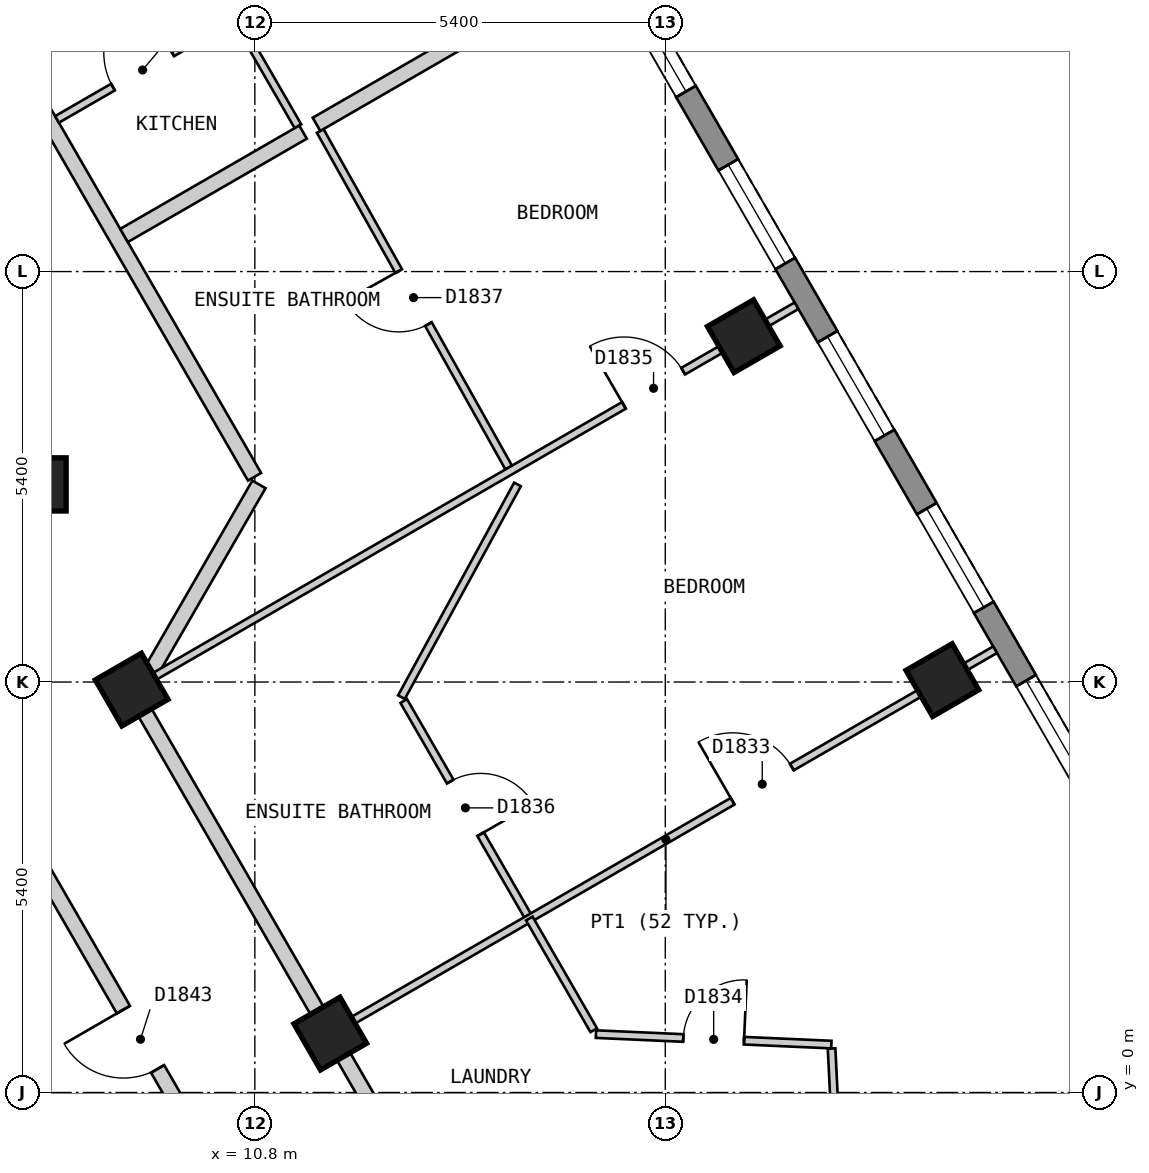
"""IFC4 building model, lengths in metres.
Left out: names, types, materials, properties, quantities, classifications, styles, units other than length and angle.
Written with IfcOpenShell. Run it as: python <this file> out.ifc"""

import sys

from ifc_helpers import new_model, si_unit, direction, frame, frame_2d, origin, origin_2d, place, context, subcontext, project, spatial, polyline, rectangle, outline, extrude, element, fill, save


model = new_model("IFC4")
c1 = context("Model", 3, precision=1e-05, world=origin(), true_north=direction((0.0, 1.0)))
c2 = subcontext(c1, "Body", "Model", "MODEL_VIEW")
j1 = project(units=[si_unit("LENGTHUNIT", "METRE"), si_unit("PLANEANGLEUNIT", "RADIAN")], contexts=[c1])
p1 = place(None, origin())
s1 = spatial("IfcSite", under=j1, at=p1, CompositionType="ELEMENT")
p2 = place(p1, origin())
s2 = spatial("IfcBuilding", under=s1, at=p2, CompositionType="ELEMENT")
p3 = place(p2, frame((0.0, 0.0, 208.8)))
s3 = spatial("IfcBuildingStorey", under=s2, at=p3, CompositionType="ELEMENT", Elevation=208.8)
for number, where, z_axis, x_axis in (
    (1, (19.846, 5.425, 0.0), (0.0, 0.0, 1.0), (-0.5, 0.866, 0.0)),
    (2, (17.233, 9.95, 0.0), (0.0, 0.0, 1.0), (-0.5, 0.866, 0.0)),
    (3, (11.792, 0.775, 0.0), (0.0, 0.0, 1.0), (-0.5, 0.866, 0.0)),
    (4, (9.179, 5.3, 0.0), (0.0, 0.0, 1.0), (-0.5, 0.866, 0.0)),
    (5, (7.967, 8.0, 0.0), (0.0, 0.0, 1.0), (1.0, 0.0, 0.0)),
):
    element("IfcColumn", number, at=place(p3, frame(where, z_axis=z_axis, x_axis=x_axis)), inside=s3, PredefinedType="COLUMN", context=c2, shape_type="SweptSolid", body=[
        extrude(rectangle(XDim=0.7, YDim=0.7, at=origin_2d()), origin(), (0.0, 0.0, 1.0), 3.0),
    ])
p4 = place(p3, frame((23.599, 0.825, 0.0), z_axis=(0.0, 0.0, 1.0), x_axis=(-0.500003656944, 0.866023292436, 0.0)))
e6 = element("IfcWall", 6, at=p4, inside=s3, PredefinedType="SOLIDWALL", context=c2, shape_type="SweptSolid", body=[
    extrude(outline(polyline([(0.0, -0.15), (22.17, -0.15), (22.09, 0.15), (0.08, 0.15), (0.0, -0.15)])), origin(), (0.0, 0.0, 1.0), 2.7),
])
p5 = place(p4, frame((1.191, 0.0, 0.15)))
e7 = element("IfcOpeningElement", 7, at=p5, cuts=e6, PredefinedType="OPENING", context=c2, shape_type="SweptSolid", body=[
    extrude(rectangle(XDim=1.5, YDim=2.1, at=frame_2d((0.75, 1.05))), frame((0.0, 0.16, 0.0), z_axis=(0.0, -1.0, 0.0), x_axis=(1.0, 0.0, 0.0)), (0.0, 0.0, 1.0), 0.32),
])
p6 = place(p4, frame((3.804, 0.0, 0.15)))
e8 = element("IfcOpeningElement", 8, at=p6, cuts=e6, PredefinedType="OPENING", context=c2, shape_type="SweptSolid", body=[
    extrude(rectangle(XDim=1.5, YDim=2.1, at=frame_2d((0.75, 1.05))), frame((0.0, 0.16, 0.0), z_axis=(0.0, -1.0, 0.0), x_axis=(1.0, 0.0, 0.0)), (0.0, 0.0, 1.0), 0.32),
])
p7 = place(p4, frame((6.417, 0.0, 0.15)))
e9 = element("IfcOpeningElement", 9, at=p7, cuts=e6, PredefinedType="OPENING", context=c2, shape_type="SweptSolid", body=[
    extrude(rectangle(XDim=1.5, YDim=2.1, at=frame_2d((0.75, 1.05))), frame((0.0, 0.16, 0.0), z_axis=(0.0, -1.0, 0.0), x_axis=(1.0, 0.0, 0.0)), (0.0, 0.0, 1.0), 0.32),
])
p8 = place(p4, frame((9.029, 0.0, 0.15)))
e10 = element("IfcOpeningElement", 10, at=p8, cuts=e6, PredefinedType="OPENING", context=c2, shape_type="SweptSolid", body=[
    extrude(rectangle(XDim=1.5, YDim=2.1, at=frame_2d((0.75, 1.05))), frame((0.0, 0.16, 0.0), z_axis=(0.0, -1.0, 0.0), x_axis=(1.0, 0.0, 0.0)), (0.0, 0.0, 1.0), 0.32),
])
p9 = place(p4, frame((11.641, 0.0, 0.15)))
e11 = element("IfcOpeningElement", 11, at=p9, cuts=e6, PredefinedType="OPENING", context=c2, shape_type="SweptSolid", body=[
    extrude(rectangle(XDim=1.5, YDim=2.1, at=frame_2d((0.75, 1.05))), frame((0.0, 0.16, 0.0), z_axis=(0.0, -1.0, 0.0), x_axis=(1.0, 0.0, 0.0)), (0.0, 0.0, 1.0), 0.32),
])
p10 = place(p4, frame((14.254, 0.0, 0.15)))
e12 = element("IfcOpeningElement", 12, at=p10, cuts=e6, PredefinedType="OPENING", context=c2, shape_type="SweptSolid", body=[
    extrude(rectangle(XDim=1.5, YDim=2.1, at=frame_2d((0.75, 1.05))), frame((0.0, 0.16, 0.0), z_axis=(0.0, -1.0, 0.0), x_axis=(1.0, 0.0, 0.0)), (0.0, 0.0, 1.0), 0.32),
])
p11 = place(p4, frame((16.866, 0.0, 0.15)))
e13 = element("IfcOpeningElement", 13, at=p11, cuts=e6, PredefinedType="OPENING", context=c2, shape_type="SweptSolid", body=[
    extrude(rectangle(XDim=1.5, YDim=2.1, at=frame_2d((0.75, 1.05))), frame((0.0, 0.16, 0.0), z_axis=(0.0, -1.0, 0.0), x_axis=(1.0, 0.0, 0.0)), (0.0, 0.0, 1.0), 0.32),
])
p12 = place(p4, frame((19.479, 0.0, 0.15)))
e14 = element("IfcOpeningElement", 14, at=p12, cuts=e6, PredefinedType="OPENING", context=c2, shape_type="SweptSolid", body=[
    extrude(rectangle(XDim=1.5, YDim=2.1, at=frame_2d((0.75, 1.05))), frame((0.0, 0.16, 0.0), z_axis=(0.0, -1.0, 0.0), x_axis=(1.0, 0.0, 0.0)), (0.0, 0.0, 1.0), 0.32),
])
p13 = place(p3, frame((8.026, 2.899, 0.0), z_axis=(0.0, 0.0, 1.0), x_axis=(0.499986018985, -0.866033475577, 0.0)))
e15 = element("IfcWall", 15, at=p13, inside=s3, PredefinedType="PARTITIONING", context=c2, shape_type="SweptSolid", body=[
    extrude(rectangle(XDim=5.078, YDim=0.2, at=frame_2d((2.539, 0.0))), origin(), (0.0, 0.0, 1.0), 2.7),
])
p14 = place(p13, frame((2.089, 0.0, 0.0)))
e16 = element("IfcOpeningElement", 16, at=p14, cuts=e15, PredefinedType="OPENING", context=c2, shape_type="SweptSolid", body=[
    extrude(rectangle(XDim=0.9, YDim=2.1, at=frame_2d((0.45, 1.05))), frame((0.0, 0.11, 0.0), z_axis=(0.0, -1.0, 0.0), x_axis=(1.0, 0.0, 0.0)), (0.0, 0.0, 1.0), 0.22),
])
p15 = place(p3, frame((9.238, 5.2, 0.0), z_axis=(0.0, 0.0, 1.0), x_axis=(0.500025705601, -0.86601056214, 0.0)))
e17 = element("IfcWall", 17, at=p15, inside=s3, PredefinedType="PARTITIONING", context=c2, shape_type="SweptSolid", body=[
    extrude(rectangle(XDim=7.735, YDim=0.2, at=frame_2d((3.868, 0.0))), origin(), (0.0, 0.0, 1.0), 2.7),
])
p16 = place(p3, frame((5.485, 17.3, 0.0), z_axis=(0.0, 0.0, 1.0), x_axis=(0.499943285704, -0.866058145322, 0.0)))
e18 = element("IfcWall", 18, at=p16, inside=s3, PredefinedType="PARTITIONING", context=c2, shape_type="SweptSolid", body=[
    extrude(rectangle(XDim=10.623, YDim=0.2, at=frame_2d((5.312, 0.0))), origin(), (0.0, 0.0, 1.0), 2.7),
])
p17 = place(p16, frame((3.901, 0.0, 0.0)))
e19 = element("IfcOpeningElement", 19, at=p17, cuts=e18, PredefinedType="OPENING", context=c2, shape_type="SweptSolid", body=[
    extrude(rectangle(XDim=1.0, YDim=2.1, at=frame_2d((0.5, 1.05))), frame((0.0, 0.11, 0.0), z_axis=(0.0, -1.0, 0.0), x_axis=(1.0, 0.0, 0.0)), (0.0, 0.0, 1.0), 0.22),
])
p18 = place(p3, frame((9.404, 5.487, 0.0), z_axis=(0.0, 0.0, 1.0), x_axis=(0.499768590677, 0.866158966803, 0.0)))
e20 = element("IfcWall", 20, at=p18, inside=s3, PredefinedType="PARTITIONING", context=c2, shape_type="SweptSolid", body=[
    extrude(rectangle(XDim=2.901, YDim=0.2, at=frame_2d((1.451, 0.0))), origin(), (0.0, 0.0, 1.0), 2.7),
])
p19 = place(p3, frame((12.759, 5.15, 0.0), z_axis=(0.0, 0.0, 1.0), x_axis=(0.499905801698, -0.866079782369, 0.0)))
e21 = element("IfcWall", 21, at=p19, inside=s3, PredefinedType="PARTITIONING", context=c2, shape_type="SweptSolid", body=[
    extrude(rectangle(XDim=3.304, YDim=0.1, at=frame_2d((1.652, 0.0))), origin(), (0.0, 0.0, 1.0), 2.7),
])
p20 = place(p19, frame((1.223, 0.0, 0.0)))
e22 = element("IfcOpeningElement", 22, at=p20, cuts=e21, PredefinedType="OPENING", context=c2, shape_type="SweptSolid", body=[
    extrude(rectangle(XDim=0.8, YDim=2.1, at=frame_2d((0.4, 1.05))), frame((0.0, 0.06, 0.0), z_axis=(0.0, -1.0, 0.0), x_axis=(1.0, 0.0, 0.0)), (0.0, 0.0, 1.0), 0.12),
])
p21 = place(p3, frame((8.854, 17.064, 0.0), z_axis=(0.0, 0.0, 1.0), x_axis=(0.500042049778, -0.866001124973, 0.0)))
e23 = element("IfcWall", 23, at=p21, inside=s3, PredefinedType="PARTITIONING", context=c2, shape_type="SweptSolid", body=[
    extrude(rectangle(XDim=5.025, YDim=0.1, at=frame_2d((2.513, 0.0))), origin(), (0.0, 0.0, 1.0), 2.7),
])
p22 = place(p21, frame((2.063, 0.0, 0.0)))
e24 = element("IfcOpeningElement", 24, at=p22, cuts=e23, PredefinedType="OPENING", context=c2, shape_type="SweptSolid", body=[
    extrude(rectangle(XDim=0.9, YDim=2.1, at=frame_2d((0.45, 1.05))), frame((0.0, 0.06, 0.0), z_axis=(0.0, -1.0, 0.0), x_axis=(1.0, 0.0, 0.0)), (0.0, 0.0, 1.0), 0.12),
])
p23 = place(p3, frame((11.66, 12.65, 0.0), z_axis=(0.0, 0.0, 1.0), x_axis=(0.488650242737, -0.872479764965, 0.0)))
e25 = element("IfcWall", 25, at=p23, inside=s3, PredefinedType="PARTITIONING", context=c2, shape_type="SweptSolid", body=[
    extrude(rectangle(XDim=5.075, YDim=0.1, at=frame_2d((2.538, 0.0))), origin(), (0.0, 0.0, 1.0), 2.7),
])
p24 = place(p23, frame((2.113, 0.0, 0.0)))
e26 = element("IfcOpeningElement", 26, at=p24, cuts=e25, PredefinedType="OPENING", context=c2, shape_type="SweptSolid", body=[
    extrude(rectangle(XDim=0.8, YDim=2.1, at=frame_2d((0.4, 1.05))), frame((0.0, 0.06, 0.0), z_axis=(0.0, -1.0, 0.0), x_axis=(1.0, 0.0, 0.0)), (0.0, 0.0, 1.0), 0.12),
])
p25 = place(p3, frame((18.388, 0.579, 0.0), z_axis=(0.0, 0.0, 1.0), x_axis=(0.049097293833, -0.998794000652, 0.0)))
e27 = element("IfcWall", 27, at=p25, inside=s3, PredefinedType="PARTITIONING", context=c2, shape_type="SweptSolid", body=[
    extrude(rectangle(XDim=2.362, YDim=0.1, at=frame_2d((1.181, 0.0))), origin(), (0.0, 0.0, 1.0), 2.7),
])
p26 = place(p3, frame((15.288, 0.768, 0.0), z_axis=(0.0, 0.0, 1.0), x_axis=(0.999006028269, -0.044575278833, 0.0)))
e28 = element("IfcWall", 28, at=p26, inside=s3, PredefinedType="PARTITIONING", context=c2, shape_type="SweptSolid", body=[
    extrude(rectangle(XDim=3.1, YDim=0.1, at=frame_2d((1.55, 0.0))), origin(), (0.0, 0.0, 1.0), 2.7),
])
p27 = place(p26, frame((1.15, 0.0, 0.0)))
e29 = element("IfcOpeningElement", 29, at=p27, cuts=e28, PredefinedType="OPENING", context=c2, shape_type="SweptSolid", body=[
    extrude(rectangle(XDim=0.8, YDim=2.1, at=frame_2d((0.4, 1.05))), frame((0.0, 0.06, 0.0), z_axis=(0.0, -1.0, 0.0), x_axis=(1.0, 0.0, 0.0)), (0.0, 0.0, 1.0), 0.12),
])
p28 = place(p3, frame((12.729, 5.201, 0.0), z_axis=(0.0, 0.0, 1.0), x_axis=(0.478932598182, 0.877851676764, 0.0)))
e30 = element("IfcWall", 30, at=p28, inside=s3, PredefinedType="PARTITIONING", context=c2, shape_type="SweptSolid", body=[
    extrude(rectangle(XDim=3.188, YDim=0.1, at=frame_2d((1.594, 0.0))), origin(), (0.0, 0.0, 1.0), 2.7),
])
p29 = place(p3, frame((11.879, 0.826, 0.0), z_axis=(0.0, 0.0, 1.0), x_axis=(0.866065245018, 0.499930986609, 0.0)))
e31 = element("IfcWall", 31, at=p29, inside=s3, PredefinedType="PARTITIONING", context=c2, shape_type="SweptSolid", body=[
    extrude(rectangle(XDim=10.0, YDim=0.1, at=frame_2d((5.0, 0.0))), origin(), (0.0, 0.0, 1.0), 2.7),
])
p30 = place(p29, frame((6.012, 0.0, 0.0)))
e32 = element("IfcOpeningElement", 32, at=p30, cuts=e31, PredefinedType="OPENING", context=c2, shape_type="SweptSolid", body=[
    extrude(rectangle(XDim=0.9, YDim=2.1, at=frame_2d((0.45, 1.05))), frame((0.0, 0.06, 0.0), z_axis=(0.0, -1.0, 0.0), x_axis=(1.0, 0.0, 0.0)), (0.0, 0.0, 1.0), 0.12),
])
p31 = place(p3, frame((9.354, 5.401, 0.0), z_axis=(0.0, 0.0, 1.0), x_axis=(0.866018411306, 0.500012111133, 0.0)))
e33 = element("IfcWall", 33, at=p31, inside=s3, PredefinedType="PARTITIONING", context=c2, shape_type="SweptSolid", body=[
    extrude(rectangle(XDim=9.898, YDim=0.1, at=frame_2d((4.949, 0.0))), origin(), (0.0, 0.0, 1.0), 2.7),
])
p32 = place(p31, frame((7.277, 0.0, 0.0)))
e34 = element("IfcOpeningElement", 34, at=p32, cuts=e33, PredefinedType="OPENING", context=c2, shape_type="SweptSolid", body=[
    extrude(rectangle(XDim=0.9, YDim=2.1, at=frame_2d((0.45, 1.05))), frame((0.0, 0.06, 0.0), z_axis=(0.0, -1.0, 0.0), x_axis=(1.0, 0.0, 0.0)), (0.0, 0.0, 1.0), 0.12),
])
p33 = place(p3, frame((8.197, 12.802, 0.0), z_axis=(0.0, 0.0, 1.0), x_axis=(0.866029095148, 0.499993606316, 0.0)))
e35 = element("IfcWall", 35, at=p33, inside=s3, PredefinedType="PARTITIONING", context=c2, shape_type="SweptSolid", body=[
    extrude(rectangle(XDim=2.65, YDim=0.1, at=frame_2d((1.325, 0.0))), origin(), (0.0, 0.0, 1.0), 2.7),
])
p34 = place(p33, frame((0.85, 0.0, 0.0)))
e36 = element("IfcOpeningElement", 36, at=p34, cuts=e35, PredefinedType="OPENING", context=c2, shape_type="SweptSolid", body=[
    extrude(rectangle(XDim=0.9, YDim=2.1, at=frame_2d((0.45, 1.05))), frame((0.0, 0.06, 0.0), z_axis=(0.0, -1.0, 0.0), x_axis=(1.0, 0.0, 0.0)), (0.0, 0.0, 1.0), 0.12),
])
p35 = place(p3, frame((9.079, 11.275, 0.0), z_axis=(0.0, 0.0, 1.0), x_axis=(0.865952340496, 0.500126527981, 0.0)))
e37 = element("IfcWall", 37, at=p35, inside=s3, PredefinedType="PARTITIONING", context=c2, shape_type="SweptSolid", body=[
    extrude(rectangle(XDim=2.719, YDim=0.2, at=frame_2d((1.36, 0.0))), origin(), (0.0, 0.0, 1.0), 2.7),
])
p36 = place(p3, frame((11.611, 12.737, 0.0), z_axis=(0.0, 0.0, 1.0), x_axis=(0.866017282483, 0.500014066243, 0.0)))
e38 = element("IfcWall", 38, at=p36, inside=s3, PredefinedType="PARTITIONING", context=c2, shape_type="SweptSolid", body=[
    extrude(rectangle(XDim=4.276, YDim=0.2, at=frame_2d((2.138, 0.0))), origin(), (0.0, 0.0, 1.0), 2.7),
])
p37 = place(p3, frame((14.411, 2.288, 0.0), z_axis=(0.0, 0.0, 1.0), x_axis=(0.500009005995, -0.866020204108, 0.0)))
e39 = element("IfcWall", 39, at=p37, inside=s3, PredefinedType="PARTITIONING", context=c2, shape_type="SweptSolid", body=[
    extrude(rectangle(XDim=1.696, YDim=0.1, at=frame_2d((0.848, 0.0))), origin(), (0.0, 0.0, 1.0), 2.7),
])
p38 = place(p6, origin())
e40 = element("IfcWindow", 40, at=p38, inside=s3, PartitioningType="SINGLE_PANEL", PredefinedType="WINDOW", context=c2, shape_type="SweptSolid", body=[
    extrude(rectangle(XDim=1.5, YDim=2.1, at=frame_2d((0.75, 1.05))), frame((0.0, 0.03, 0.0), z_axis=(0.0, -1.0, 0.0), x_axis=(1.0, 0.0, 0.0)), (0.0, 0.0, 1.0), 0.06),
])
fill(e8, e40)
p39 = place(p7, origin())
e41 = element("IfcWindow", 41, at=p39, inside=s3, PartitioningType="SINGLE_PANEL", PredefinedType="WINDOW", context=c2, shape_type="SweptSolid", body=[
    extrude(rectangle(XDim=1.5, YDim=2.1, at=frame_2d((0.75, 1.05))), frame((0.0, 0.03, 0.0), z_axis=(0.0, -1.0, 0.0), x_axis=(1.0, 0.0, 0.0)), (0.0, 0.0, 1.0), 0.06),
])
fill(e9, e41)
p40 = place(p8, origin())
e42 = element("IfcWindow", 42, at=p40, inside=s3, PartitioningType="SINGLE_PANEL", PredefinedType="WINDOW", context=c2, shape_type="SweptSolid", body=[
    extrude(rectangle(XDim=1.5, YDim=2.1, at=frame_2d((0.75, 1.05))), frame((0.0, 0.03, 0.0), z_axis=(0.0, -1.0, 0.0), x_axis=(1.0, 0.0, 0.0)), (0.0, 0.0, 1.0), 0.06),
])
fill(e10, e42)
p41 = place(p9, origin())
e43 = element("IfcWindow", 43, at=p41, inside=s3, PartitioningType="SINGLE_PANEL", PredefinedType="WINDOW", context=c2, shape_type="SweptSolid", body=[
    extrude(rectangle(XDim=1.5, YDim=2.1, at=frame_2d((0.75, 1.05))), frame((0.0, 0.03, 0.0), z_axis=(0.0, -1.0, 0.0), x_axis=(1.0, 0.0, 0.0)), (0.0, 0.0, 1.0), 0.06),
])
fill(e11, e43)
p42 = place(p10, origin())
e44 = element("IfcWindow", 44, at=p42, inside=s3, PartitioningType="SINGLE_PANEL", PredefinedType="WINDOW", context=c2, shape_type="SweptSolid", body=[
    extrude(rectangle(XDim=1.5, YDim=2.1, at=frame_2d((0.75, 1.05))), frame((0.0, 0.03, 0.0), z_axis=(0.0, -1.0, 0.0), x_axis=(1.0, 0.0, 0.0)), (0.0, 0.0, 1.0), 0.06),
])
fill(e12, e44)
p43 = place(p30, origin())
e45 = element("IfcDoor", 45, at=p43, inside=s3, OperationType="SINGLE_SWING_LEFT", PredefinedType="DOOR", context=c2, shape_type="SweptSolid", body=[
    extrude(rectangle(XDim=0.9, YDim=2.1, at=frame_2d((0.45, 1.05))), frame((0.0, 0.025, 0.0), z_axis=(0.0, -1.0, 0.0), x_axis=(1.0, 0.0, 0.0)), (0.0, 0.0, 1.0), 0.05),
])
fill(e32, e45)
p44 = place(p27, origin())
e46 = element("IfcDoor", 46, at=p44, inside=s3, OperationType="SINGLE_SWING_RIGHT", PredefinedType="DOOR", context=c2, shape_type="SweptSolid", body=[
    extrude(rectangle(XDim=0.8, YDim=2.1, at=frame_2d((0.4, 1.05))), frame((0.0, 0.025, 0.0), z_axis=(0.0, -1.0, 0.0), x_axis=(1.0, 0.0, 0.0)), (0.0, 0.0, 1.0), 0.05),
])
fill(e29, e46)
p45 = place(p32, origin())
e47 = element("IfcDoor", 47, at=p45, inside=s3, OperationType="SINGLE_SWING_LEFT", PredefinedType="DOOR", context=c2, shape_type="SweptSolid", body=[
    extrude(rectangle(XDim=0.9, YDim=2.1, at=frame_2d((0.45, 1.05))), frame((0.0, 0.025, 0.0), z_axis=(0.0, -1.0, 0.0), x_axis=(1.0, 0.0, 0.0)), (0.0, 0.0, 1.0), 0.05),
])
fill(e34, e47)
p46 = place(p20, origin())
e48 = element("IfcDoor", 48, at=p46, inside=s3, OperationType="SINGLE_SWING_RIGHT", PredefinedType="DOOR", context=c2, shape_type="SweptSolid", body=[
    extrude(rectangle(XDim=0.8, YDim=2.1, at=frame_2d((0.4, 1.05))), frame((0.0, 0.025, 0.0), z_axis=(0.0, -1.0, 0.0), x_axis=(1.0, 0.0, 0.0)), (0.0, 0.0, 1.0), 0.05),
])
fill(e22, e48)
p47 = place(p24, origin())
e49 = element("IfcDoor", 49, at=p47, inside=s3, OperationType="SINGLE_SWING_LEFT", PredefinedType="DOOR", context=c2, shape_type="SweptSolid", body=[
    extrude(rectangle(XDim=0.8, YDim=2.1, at=frame_2d((0.4, 1.05))), frame((0.0, 0.025, 0.0), z_axis=(0.0, -1.0, 0.0), x_axis=(1.0, 0.0, 0.0)), (0.0, 0.0, 1.0), 0.05),
])
fill(e26, e49)
p48 = place(p34, origin())
e50 = element("IfcDoor", 50, at=p48, inside=s3, OperationType="SINGLE_SWING_RIGHT", PredefinedType="DOOR", context=c2, shape_type="SweptSolid", body=[
    extrude(rectangle(XDim=0.9, YDim=2.1, at=frame_2d((0.45, 1.05))), frame((0.0, 0.025, 0.0), z_axis=(0.0, -1.0, 0.0), x_axis=(1.0, 0.0, 0.0)), (0.0, 0.0, 1.0), 0.05),
])
fill(e36, e50)
p49 = place(p14, origin())
e51 = element("IfcDoor", 51, at=p49, inside=s3, OperationType="SINGLE_SWING_LEFT", PredefinedType="DOOR", context=c2, shape_type="SweptSolid", body=[
    extrude(rectangle(XDim=0.9, YDim=2.1, at=frame_2d((0.45, 1.05))), frame((0.0, 0.025, 0.0), z_axis=(0.0, -1.0, 0.0), x_axis=(1.0, 0.0, 0.0)), (0.0, 0.0, 1.0), 0.05),
])
fill(e16, e51)
save(model, sys.argv[1])
